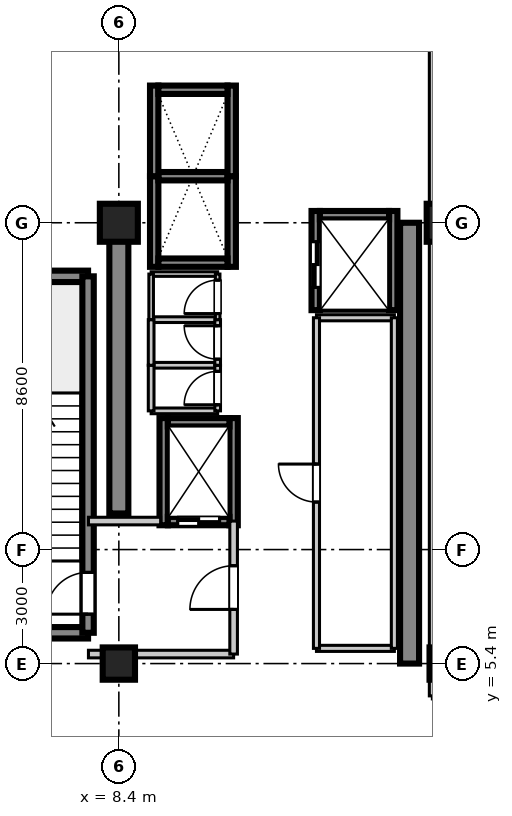
"""IFC4 building model, lengths in metres.
Left out: names, types, materials, properties, quantities, classifications, styles, units other than length and angle.
Written with IfcOpenShell. Run it as: python <this file> out.ifc"""

import sys

from ifc_helpers import new_model, si_unit, direction, frame, frame_2d, origin, origin_2d, place, context, subcontext, project, spatial, rectangle, extrude, source, transform, mapped, element, fill, save


model = new_model("IFC4")
c1 = context("Model", 3, precision=1e-05, world=origin(), true_north=direction((0.0, 1.0)))
c2 = subcontext(c1, "Body", "Model", "MODEL_VIEW")
j1 = project(units=[si_unit("LENGTHUNIT", "METRE"), si_unit("PLANEANGLEUNIT", "RADIAN")], contexts=[c1])
p1 = place(None, origin())
s1 = spatial("IfcSite", under=j1, at=p1, CompositionType="ELEMENT")
p2 = place(p1, origin())
s2 = spatial("IfcBuilding", under=s1, at=p2, CompositionType="ELEMENT")
p3 = place(p2, frame((0.0, 0.0, 256.7)))
s3 = spatial("IfcBuildingStorey", under=s2, at=p3, CompositionType="ELEMENT", Elevation=256.7)
m1 = source(origin(), c2, "Body", "SweptSolid", [
    extrude(rectangle(XDim=0.85, YDim=0.85, at=origin_2d()), origin(), (0.0, 0.0, 1.0), 4.755),
])
p4 = place(p3, frame((8.4, 5.4, 0.0), z_axis=(0.0, 0.0, 1.0), x_axis=(1.0, 0.0, 0.0)))
e1 = element("IfcColumn", 1, at=p4, inside=s3, PredefinedType="PILASTER", context=c2, shape_type="MappedRepresentation", body=[
    mapped(m1, transform((0.0, 0.0, 0.0), scale=1.0)),
])
m2 = source(origin(), c2, "Body", "SweptSolid", [
    extrude(rectangle(XDim=1.0, YDim=1.0, at=origin_2d()), origin(), (0.0, 0.0, 1.0), 4.755),
])
p5 = place(p3, frame((8.4, 17.0, 0.0), z_axis=(0.0, 0.0, 1.0), x_axis=(1.0, 0.0, 0.0)))
e2 = element("IfcColumn", 2, at=p5, inside=s3, PredefinedType="COLUMN", context=c2, shape_type="MappedRepresentation", body=[
    mapped(m2, transform((0.0, 0.0, 0.0), scale=1.0)),
])
p6 = place(p3, frame((17.0, 5.4, 0.0), z_axis=(0.0, 0.0, 1.0), x_axis=(1.0, 0.0, 0.0)))
e3 = element("IfcColumn", 3, at=p6, inside=s3, PredefinedType="PILASTER", context=c2, shape_type="MappedRepresentation", body=[
    mapped(m1, transform((0.0, 0.0, 0.0), scale=1.0)),
])
p7 = place(p3, frame((17.0, 17.0, 0.0), z_axis=(0.0, 0.0, 1.0), x_axis=(1.0, 0.0, 0.0)))
e4 = element("IfcColumn", 4, at=p7, inside=s3, PredefinedType="COLUMN", context=c2, shape_type="MappedRepresentation", body=[
    mapped(m2, transform((0.0, 0.0, 0.0), scale=1.0)),
])
m3 = source(origin(), c2, "Body", "SweptSolid", [
    extrude(rectangle(XDim=7.65, YDim=0.5, at=frame_2d((3.825, 0.0))), origin(), (0.0, 0.0, 1.0), 4.44),
])
p8 = place(p3, frame((8.4, 9.35, 0.0), z_axis=(0.0, 0.0, 1.0), x_axis=(0.0, 1.0, 0.0)))
e5 = element("IfcWall", 5, at=p8, inside=s3, PredefinedType="SHEAR", context=c2, shape_type="MappedRepresentation", body=[
    mapped(m3, transform((0.0, 0.0, 0.0), scale=1.0)),
])
m4 = source(origin(), c2, "Body", "SweptSolid", [
    extrude(rectangle(XDim=11.6, YDim=0.5, at=frame_2d((5.8, 0.0))), origin(), (0.0, 0.0, 1.0), 4.44),
])
p9 = place(p3, frame((16.05, 5.4, 0.0), z_axis=(0.0, 0.0, 1.0), x_axis=(0.0, 1.0, 0.0)))
e6 = element("IfcWall", 6, at=p9, inside=s3, PredefinedType="SHEAR", context=c2, shape_type="MappedRepresentation", body=[
    mapped(m4, transform((0.0, 0.0, 0.0), scale=1.0)),
])
m5 = source(origin(), c2, "Body", "SweptSolid", [
    extrude(rectangle(XDim=3.98, YDim=0.3, at=frame_2d((1.99, 0.0))), origin(), (0.0, 0.0, 1.0), 4.44),
])
for number, where, z_axis, x_axis in (
    (7, (3.61, 6.21, 0.0), (0.0, 0.0, 1.0), (1.0, 0.0, 0.0)),
    (8, (3.61, 15.59, 0.0), (0.0, 0.0, 1.0), (1.0, 0.0, 0.0)),
):
    element("IfcWall", number, at=place(p3, frame(where, z_axis=z_axis, x_axis=x_axis)), inside=s3, PredefinedType="SHEAR", context=c2, shape_type="MappedRepresentation", body=[
        mapped(m5, transform((0.0, 0.0, 0.0), scale=1.0)),
    ])
m6 = source(origin(), c2, "Body", "SweptSolid", [
    extrude(rectangle(XDim=9.38, YDim=0.3, at=frame_2d((4.69, 0.0))), origin(), (0.0, 0.0, 1.0), 4.44),
])
p10 = place(p3, frame((7.59, 6.21, 0.0), z_axis=(0.0, 0.0, 1.0), x_axis=(0.0, 1.0, 0.0)))
e9 = element("IfcWall", 9, at=p10, inside=s3, PredefinedType="SHEAR", context=c2, shape_type="MappedRepresentation", body=[
    mapped(m6, transform((0.0, 0.0, 0.0), scale=1.0)),
])
p11 = place(p10, frame((0.49, 0.0, 0.0)))
e10 = element("IfcOpeningElement", 10, at=p11, cuts=e9, PredefinedType="OPENING", context=c2, shape_type="SweptSolid", body=[
    extrude(rectangle(XDim=1.1, YDim=2.15, at=frame_2d((0.55, 1.075))), frame((0.0, 0.16, 0.0), z_axis=(0.0, -1.0, 0.0), x_axis=(1.0, 0.0, 0.0)), (0.0, 0.0, 1.0), 0.32),
])
m7 = source(origin(), c2, "Body", "SweptSolid", [
    extrude(rectangle(XDim=2.385, YDim=0.22, at=frame_2d((1.192, 0.0))), origin(), (0.0, 0.0, 1.0), 4.44),
])
for number, where, z_axis, x_axis in (
    (11, (9.33, 15.84, 0.0), (0.0, 0.0, 1.0), (0.0, 1.0, 0.0)),
    (12, (11.37, 15.84, 0.0), (0.0, 0.0, 1.0), (0.0, 1.0, 0.0)),
):
    element("IfcWall", number, at=place(p3, frame(where, z_axis=z_axis, x_axis=x_axis)), inside=s3, PredefinedType="SHEAR", context=c2, shape_type="MappedRepresentation", body=[
        mapped(m7, transform((0.0, 0.0, 0.0), scale=1.0)),
    ])
m8 = source(origin(), c2, "Body", "SweptSolid", [
    extrude(rectangle(XDim=1.82, YDim=0.22, at=frame_2d((0.91, 0.0))), origin(), (0.0, 0.0, 1.0), 4.44),
])
p12 = place(p3, frame((9.44, 15.95, 0.0), z_axis=(0.0, 0.0, 1.0), x_axis=(1.0, 0.0, 0.0)))
e13 = element("IfcWall", 13, at=p12, inside=s3, PredefinedType="SHEAR", context=c2, shape_type="MappedRepresentation", body=[
    mapped(m8, transform((0.0, 0.0, 0.0), scale=1.0)),
])
m9 = source(origin(), c2, "Body", "SweptSolid", [
    extrude(rectangle(XDim=1.82, YDim=0.22, at=frame_2d((0.91, 0.0))), origin(), (0.0, 0.0, 1.0), 4.8),
])
p13 = place(p3, frame((9.44, 18.225, 0.0), z_axis=(0.0, 0.0, 1.0), x_axis=(1.0, 0.0, 0.0)))
e14 = element("IfcWall", 14, at=p13, inside=s3, PredefinedType="SHEAR", context=c2, shape_type="MappedRepresentation", body=[
    mapped(m9, transform((0.0, 0.0, 0.0), scale=1.0)),
])
for number, where, z_axis, x_axis in (
    (15, (9.33, 18.225, 0.0), (0.0, 0.0, 1.0), (0.0, 1.0, 0.0)),
    (16, (11.37, 18.225, 0.0), (0.0, 0.0, 1.0), (0.0, 1.0, 0.0)),
):
    element("IfcWall", number, at=place(p3, frame(where, z_axis=z_axis, x_axis=x_axis)), inside=s3, PredefinedType="SHEAR", context=c2, shape_type="MappedRepresentation", body=[
        mapped(m7, transform((0.0, 0.0, 0.0), scale=1.0)),
    ])
p14 = place(p3, frame((9.44, 20.5, 0.0), z_axis=(0.0, 0.0, 1.0), x_axis=(1.0, 0.0, 0.0)))
e17 = element("IfcWall", 17, at=p14, inside=s3, PredefinedType="SHEAR", context=c2, shape_type="MappedRepresentation", body=[
    mapped(m8, transform((0.0, 0.0, 0.0), scale=1.0)),
])
m10 = source(origin(), c2, "Body", "SweptSolid", [
    extrude(rectangle(XDim=2.82, YDim=0.22, at=frame_2d((1.41, 0.0))), origin(), (0.0, 0.0, 1.0), 4.44),
])
for number, where, z_axis, x_axis in (
    (18, (9.58, 9.04, 0.0), (0.0, 0.0, 1.0), (0.0, 1.0, 0.0)),
    (19, (11.42, 9.04, 0.0), (0.0, 0.0, 1.0), (0.0, 1.0, 0.0)),
):
    element("IfcWall", number, at=place(p3, frame(where, z_axis=z_axis, x_axis=x_axis)), inside=s3, PredefinedType="SHEAR", context=c2, shape_type="MappedRepresentation", body=[
        mapped(m10, transform((0.0, 0.0, 0.0), scale=1.0)),
    ])
m11 = source(origin(), c2, "Body", "SweptSolid", [
    extrude(rectangle(XDim=1.62, YDim=0.22, at=frame_2d((0.81, 0.0))), origin(), (0.0, 0.0, 1.0), 4.44),
])
p15 = place(p3, frame((9.69, 9.15, 0.0), z_axis=(0.0, 0.0, 1.0), x_axis=(1.0, 0.0, 0.0)))
e20 = element("IfcWall", 20, at=p15, inside=s3, PredefinedType="SHEAR", context=c2, shape_type="MappedRepresentation", body=[
    mapped(m11, transform((0.0, 0.0, 0.0), scale=1.0)),
])
p16 = place(p15, frame((0.26, 0.0, 0.0)))
e21 = element("IfcOpeningElement", 21, at=p16, cuts=e20, PredefinedType="OPENING", context=c2, shape_type="SweptSolid", body=[
    extrude(rectangle(XDim=1.1, YDim=2.2, at=frame_2d((0.55, 1.1))), frame((0.0, 0.12, 0.0), z_axis=(0.0, -1.0, 0.0), x_axis=(1.0, 0.0, 0.0)), (0.0, 0.0, 1.0), 0.24),
])
p17 = place(p3, frame((9.69, 11.75, 0.0), z_axis=(0.0, 0.0, 1.0), x_axis=(1.0, 0.0, 0.0)))
e22 = element("IfcWall", 22, at=p17, inside=s3, PredefinedType="SHEAR", context=c2, shape_type="MappedRepresentation", body=[
    mapped(m11, transform((0.0, 0.0, 0.0), scale=1.0)),
])
m12 = source(origin(), c2, "Body", "SweptSolid", [
    extrude(rectangle(XDim=2.61, YDim=0.22, at=frame_2d((1.305, 0.0))), origin(), (0.0, 0.0, 1.0), 4.44),
])
p18 = place(p3, frame((13.58, 14.7, 0.0), z_axis=(0.0, 0.0, 1.0), x_axis=(0.0, 1.0, 0.0)))
e23 = element("IfcWall", 23, at=p18, inside=s3, PredefinedType="SHEAR", context=c2, shape_type="MappedRepresentation", body=[
    mapped(m12, transform((0.0, 0.0, 0.0), scale=1.0)),
])
p19 = place(p18, frame((0.6, 0.0, 0.0)))
e24 = element("IfcOpeningElement", 24, at=p19, cuts=e23, PredefinedType="OPENING", context=c2, shape_type="SweptSolid", body=[
    extrude(rectangle(XDim=1.2, YDim=2.2, at=frame_2d((0.6, 1.1))), frame((0.0, 0.12, 0.0), z_axis=(0.0, -1.0, 0.0), x_axis=(1.0, 0.0, 0.0)), (0.0, 0.0, 1.0), 0.24),
])
p20 = place(p3, frame((15.62, 14.7, 0.0), z_axis=(0.0, 0.0, 1.0), x_axis=(0.0, 1.0, 0.0)))
e25 = element("IfcWall", 25, at=p20, inside=s3, PredefinedType="SHEAR", context=c2, shape_type="MappedRepresentation", body=[
    mapped(m12, transform((0.0, 0.0, 0.0), scale=1.0)),
])
p21 = place(p3, frame((13.69, 17.2, 0.0), z_axis=(0.0, 0.0, 1.0), x_axis=(1.0, 0.0, 0.0)))
e26 = element("IfcWall", 26, at=p21, inside=s3, PredefinedType="SHEAR", context=c2, shape_type="MappedRepresentation", body=[
    mapped(m8, transform((0.0, 0.0, 0.0), scale=1.0)),
])
m13 = source(origin(), c2, "Body", "SweptSolid", [
    extrude(rectangle(XDim=3.82, YDim=0.2, at=frame_2d((1.91, 0.0))), origin(), (0.0, 0.0, 1.0), 3.4),
])
p22 = place(p3, frame((7.6, 5.65, 0.0), z_axis=(0.0, 0.0, 1.0), x_axis=(1.0, 0.0, 0.0)))
e27 = element("IfcWall", 27, at=p22, inside=s3, PredefinedType="PARTITIONING", context=c2, shape_type="MappedRepresentation", body=[
    mapped(m13, transform((0.0, 0.0, 0.0), scale=1.0)),
])
m14 = source(origin(), c2, "Body", "SweptSolid", [
    extrude(rectangle(XDim=1.9, YDim=0.2, at=frame_2d((0.95, 0.0))), origin(), (0.0, 0.0, 1.0), 3.4),
])
p23 = place(p3, frame((7.6, 9.15, 0.0), z_axis=(0.0, 0.0, 1.0), x_axis=(1.0, 0.0, 0.0)))
e28 = element("IfcWall", 28, at=p23, inside=s3, PredefinedType="PARTITIONING", context=c2, shape_type="MappedRepresentation", body=[
    mapped(m14, transform((0.0, 0.0, 0.0), scale=1.0)),
])
m15 = source(origin(), c2, "Body", "SweptSolid", [
    extrude(rectangle(XDim=3.5, YDim=0.2, at=frame_2d((1.75, 0.0))), origin(), (0.0, 0.0, 1.0), 3.4),
])
p24 = place(p3, frame((11.42, 5.65, 0.0), z_axis=(0.0, 0.0, 1.0), x_axis=(0.0, 1.0, 0.0)))
e29 = element("IfcWall", 29, at=p24, inside=s3, PredefinedType="PARTITIONING", context=c2, shape_type="MappedRepresentation", body=[
    mapped(m15, transform((0.0, 0.0, 0.0), scale=1.0)),
])
p25 = place(p24, frame((1.175, 0.0, 0.0)))
e30 = element("IfcOpeningElement", 30, at=p25, cuts=e29, PredefinedType="OPENING", context=c2, shape_type="SweptSolid", body=[
    extrude(rectangle(XDim=1.15, YDim=2.15, at=frame_2d((0.575, 1.075))), frame((0.0, 0.11, 0.0), z_axis=(0.0, -1.0, 0.0), x_axis=(1.0, 0.0, 0.0)), (0.0, 0.0, 1.0), 0.22),
])
m16 = source(origin(), c2, "Body", "SweptSolid", [
    extrude(rectangle(XDim=1.75, YDim=0.15, at=frame_2d((0.875, 0.0))), origin(), (0.0, 0.0, 1.0), 3.4),
])
for number, where, z_axis, x_axis in (
    (31, (9.25, 12.05, 0.0), (0.0, 0.0, 1.0), (1.0, 0.0, 0.0)),
    (32, (9.25, 13.25, 0.0), (0.0, 0.0, 1.0), (1.0, 0.0, 0.0)),
):
    element("IfcWall", number, at=place(p3, frame(where, z_axis=z_axis, x_axis=x_axis)), inside=s3, PredefinedType="PARTITIONING", context=c2, shape_type="MappedRepresentation", body=[
        mapped(m16, transform((0.0, 0.0, 0.0), scale=1.0)),
    ])
m17 = source(origin(), c2, "Body", "SweptSolid", [
    extrude(rectangle(XDim=1.2, YDim=0.15, at=frame_2d((0.6, 0.0))), origin(), (0.0, 0.0, 1.0), 3.4),
])
p26 = place(p3, frame((9.25, 12.05, 0.0), z_axis=(0.0, 0.0, 1.0), x_axis=(0.0, 1.0, 0.0)))
e33 = element("IfcWall", 33, at=p26, inside=s3, PredefinedType="PARTITIONING", context=c2, shape_type="MappedRepresentation", body=[
    mapped(m17, transform((0.0, 0.0, 0.0), scale=1.0)),
])
p27 = place(p3, frame((11.0, 12.05, 0.0), z_axis=(0.0, 0.0, 1.0), x_axis=(0.0, 1.0, 0.0)))
e34 = element("IfcWall", 34, at=p27, inside=s3, PredefinedType="PARTITIONING", context=c2, shape_type="MappedRepresentation", body=[
    mapped(m17, transform((0.0, 0.0, 0.0), scale=1.0)),
])
p28 = place(p27, frame((0.16, 0.0, 0.0)))
e35 = element("IfcOpeningElement", 35, at=p28, cuts=e34, PredefinedType="OPENING", context=c2, shape_type="SweptSolid", body=[
    extrude(rectangle(XDim=0.88, YDim=2.1, at=frame_2d((0.44, 1.05))), frame((0.0, 0.085, 0.0), z_axis=(0.0, -1.0, 0.0), x_axis=(1.0, 0.0, 0.0)), (0.0, 0.0, 1.0), 0.17),
])
p29 = place(p3, frame((9.25, 14.45, 0.0), z_axis=(0.0, 0.0, 1.0), x_axis=(1.0, 0.0, 0.0)))
e36 = element("IfcWall", 36, at=p29, inside=s3, PredefinedType="PARTITIONING", context=c2, shape_type="MappedRepresentation", body=[
    mapped(m16, transform((0.0, 0.0, 0.0), scale=1.0)),
])
p30 = place(p3, frame((9.25, 13.25, 0.0), z_axis=(0.0, 0.0, 1.0), x_axis=(0.0, 1.0, 0.0)))
e37 = element("IfcWall", 37, at=p30, inside=s3, PredefinedType="PARTITIONING", context=c2, shape_type="MappedRepresentation", body=[
    mapped(m17, transform((0.0, 0.0, 0.0), scale=1.0)),
])
p31 = place(p3, frame((11.0, 13.25, 0.0), z_axis=(0.0, 0.0, 1.0), x_axis=(0.0, 1.0, 0.0)))
e38 = element("IfcWall", 38, at=p31, inside=s3, PredefinedType="PARTITIONING", context=c2, shape_type="MappedRepresentation", body=[
    mapped(m17, transform((0.0, 0.0, 0.0), scale=1.0)),
])
p32 = place(p31, frame((0.16, 0.0, 0.0)))
e39 = element("IfcOpeningElement", 39, at=p32, cuts=e38, PredefinedType="OPENING", context=c2, shape_type="SweptSolid", body=[
    extrude(rectangle(XDim=0.88, YDim=2.1, at=frame_2d((0.44, 1.05))), frame((0.0, 0.085, 0.0), z_axis=(0.0, -1.0, 0.0), x_axis=(1.0, 0.0, 0.0)), (0.0, 0.0, 1.0), 0.17),
])
m18 = source(origin(), c2, "Body", "SweptSolid", [
    extrude(rectangle(XDim=1.75, YDim=0.12, at=frame_2d((0.875, 0.0))), origin(), (0.0, 0.0, 1.0), 3.4),
])
p33 = place(p3, frame((9.25, 15.65, 0.0), z_axis=(0.0, 0.0, 1.0), x_axis=(1.0, 0.0, 0.0)))
e40 = element("IfcWall", 40, at=p33, inside=s3, PredefinedType="PARTITIONING", context=c2, shape_type="MappedRepresentation", body=[
    mapped(m18, transform((0.0, 0.0, 0.0), scale=1.0)),
])
m19 = source(origin(), c2, "Body", "SweptSolid", [
    extrude(rectangle(XDim=1.2, YDim=0.12, at=frame_2d((0.6, 0.0))), origin(), (0.0, 0.0, 1.0), 3.4),
])
p34 = place(p3, frame((9.25, 14.45, 0.0), z_axis=(0.0, 0.0, 1.0), x_axis=(0.0, 1.0, 0.0)))
e41 = element("IfcWall", 41, at=p34, inside=s3, PredefinedType="PARTITIONING", context=c2, shape_type="MappedRepresentation", body=[
    mapped(m19, transform((0.0, 0.0, 0.0), scale=1.0)),
])
p35 = place(p3, frame((11.0, 14.45, 0.0), z_axis=(0.0, 0.0, 1.0), x_axis=(0.0, 1.0, 0.0)))
e42 = element("IfcWall", 42, at=p35, inside=s3, PredefinedType="PARTITIONING", context=c2, shape_type="MappedRepresentation", body=[
    mapped(m19, transform((0.0, 0.0, 0.0), scale=1.0)),
])
p36 = place(p35, frame((0.16, 0.0, 0.0)))
e43 = element("IfcOpeningElement", 43, at=p36, cuts=e42, PredefinedType="OPENING", context=c2, shape_type="SweptSolid", body=[
    extrude(rectangle(XDim=0.88, YDim=2.1, at=frame_2d((0.44, 1.05))), frame((0.0, 0.07, 0.0), z_axis=(0.0, -1.0, 0.0), x_axis=(1.0, 0.0, 0.0)), (0.0, 0.0, 1.0), 0.14),
])
m20 = source(origin(), c2, "Body", "SweptSolid", [
    extrude(rectangle(XDim=2.05, YDim=0.16, at=frame_2d((1.025, 0.0))), origin(), (0.0, 0.0, 1.0), 3.4),
])
for number, where, z_axis, x_axis in (
    (44, (13.6, 5.8, 0.0), (0.0, 0.0, 1.0), (1.0, 0.0, 0.0)),
    (45, (13.6, 14.5, 0.0), (0.0, 0.0, 1.0), (1.0, 0.0, 0.0)),
):
    element("IfcWall", number, at=place(p3, frame(where, z_axis=z_axis, x_axis=x_axis)), inside=s3, PredefinedType="PARTITIONING", context=c2, shape_type="MappedRepresentation", body=[
        mapped(m20, transform((0.0, 0.0, 0.0), scale=1.0)),
    ])
m21 = source(origin(), c2, "Body", "SweptSolid", [
    extrude(rectangle(XDim=8.7, YDim=0.16, at=frame_2d((4.35, 0.0))), origin(), (0.0, 0.0, 1.0), 3.4),
])
p37 = place(p3, frame((13.6, 5.8, 0.0), z_axis=(0.0, 0.0, 1.0), x_axis=(0.0, 1.0, 0.0)))
e46 = element("IfcWall", 46, at=p37, inside=s3, PredefinedType="PARTITIONING", context=c2, shape_type="MappedRepresentation", body=[
    mapped(m21, transform((0.0, 0.0, 0.0), scale=1.0)),
])
p38 = place(p37, frame((3.85, 0.0, 0.0)))
e47 = element("IfcOpeningElement", 47, at=p38, cuts=e46, PredefinedType="OPENING", context=c2, shape_type="SweptSolid", body=[
    extrude(rectangle(XDim=1.0, YDim=2.1, at=frame_2d((0.5, 1.05))), frame((0.0, 0.09, 0.0), z_axis=(0.0, -1.0, 0.0), x_axis=(1.0, 0.0, 0.0)), (0.0, 0.0, 1.0), 0.18),
])
p39 = place(p3, frame((15.65, 5.8, 0.0), z_axis=(0.0, 0.0, 1.0), x_axis=(0.0, 1.0, 0.0)))
e48 = element("IfcWall", 48, at=p39, inside=s3, PredefinedType="PARTITIONING", context=c2, shape_type="MappedRepresentation", body=[
    mapped(m21, transform((0.0, 0.0, 0.0), scale=1.0)),
])
m22 = source(origin(), c2, "Body", "SweptSolid", [
    extrude(rectangle(XDim=19.35, YDim=0.16, at=frame_2d((9.675, 0.0))), origin(), (0.0, 0.0, 1.0), 3.4),
])
p40 = place(p3, frame((16.65, 4.55, 0.0), z_axis=(0.0, 0.0, 1.0), x_axis=(0.0, 1.0, 0.0)))
e49 = element("IfcWall", 49, at=p40, inside=s3, PredefinedType="PARTITIONING", context=c2, shape_type="MappedRepresentation", body=[
    mapped(m22, transform((0.0, 0.0, 0.0), scale=1.0)),
])
m23 = source(origin(), c2, "Body", "SweptSolid", [
    extrude(rectangle(XDim=1.1, YDim=2.15, at=frame_2d((0.55, 1.075))), frame((0.0, 0.025, 0.0), z_axis=(0.0, -1.0, 0.0), x_axis=(1.0, 0.0, 0.0)), (0.0, 0.0, 1.0), 0.05),
])
p41 = place(p11, origin())
e50 = element("IfcDoor", 50, at=p41, inside=s3, OperationType="SINGLE_SWING_LEFT", PredefinedType="DOOR", context=c2, shape_type="MappedRepresentation", body=[
    mapped(m23, transform((0.0, 0.0, 0.0), scale=1.0)),
])
fill(e10, e50)
m24 = source(origin(), c2, "Body", "SweptSolid", [
    extrude(rectangle(XDim=1.1, YDim=2.2, at=frame_2d((0.55, 1.1))), frame((0.0, 0.025, 0.0), z_axis=(0.0, -1.0, 0.0), x_axis=(1.0, 0.0, 0.0)), (0.0, 0.0, 1.0), 0.05),
])
p42 = place(p16, frame((1.1, 0.0, 0.0), z_axis=(0.0, 0.0, 1.0), x_axis=(-1.0, 0.0, 0.0)))
e51 = element("IfcDoor", 51, at=p42, inside=s3, OperationType="DOUBLE_DOOR_SLIDING", PredefinedType="DOOR", context=c2, shape_type="MappedRepresentation", body=[
    mapped(m24, transform((0.0, 0.0, 0.0), scale=1.0)),
])
fill(e21, e51)
m25 = source(origin(), c2, "Body", "SweptSolid", [
    extrude(rectangle(XDim=1.2, YDim=2.2, at=frame_2d((0.6, 1.1))), frame((0.0, 0.025, 0.0), z_axis=(0.0, -1.0, 0.0), x_axis=(1.0, 0.0, 0.0)), (0.0, 0.0, 1.0), 0.05),
])
p43 = place(p19, origin())
e52 = element("IfcDoor", 52, at=p43, inside=s3, OperationType="DOUBLE_DOOR_SLIDING", PredefinedType="DOOR", context=c2, shape_type="MappedRepresentation", body=[
    mapped(m25, transform((0.0, 0.0, 0.0), scale=1.0)),
])
fill(e24, e52)
m26 = source(origin(), c2, "Body", "SweptSolid", [
    extrude(rectangle(XDim=1.15, YDim=2.15, at=frame_2d((0.575, 1.075))), frame((0.0, 0.025, 0.0), z_axis=(0.0, -1.0, 0.0), x_axis=(1.0, 0.0, 0.0)), (0.0, 0.0, 1.0), 0.05),
])
p44 = place(p25, frame((1.15, 0.0, 0.0), z_axis=(0.0, 0.0, 1.0), x_axis=(-1.0, 0.0, 0.0)))
e53 = element("IfcDoor", 53, at=p44, inside=s3, OperationType="SINGLE_SWING_LEFT", PredefinedType="DOOR", context=c2, shape_type="MappedRepresentation", body=[
    mapped(m26, transform((0.0, 0.0, 0.0), scale=1.0)),
])
fill(e30, e53)
m27 = source(origin(), c2, "Body", "SweptSolid", [
    extrude(rectangle(XDim=0.88, YDim=2.1, at=frame_2d((0.44, 1.05))), frame((0.0, 0.025, 0.0), z_axis=(0.0, -1.0, 0.0), x_axis=(1.0, 0.0, 0.0)), (0.0, 0.0, 1.0), 0.05),
])
p45 = place(p28, origin())
e54 = element("IfcDoor", 54, at=p45, inside=s3, OperationType="SINGLE_SWING_LEFT", PredefinedType="DOOR", context=c2, shape_type="MappedRepresentation", body=[
    mapped(m27, transform((0.0, 0.0, 0.0), scale=1.0)),
])
fill(e35, e54)
p46 = place(p32, origin())
e55 = element("IfcDoor", 55, at=p46, inside=s3, OperationType="SINGLE_SWING_RIGHT", PredefinedType="DOOR", context=c2, shape_type="MappedRepresentation", body=[
    mapped(m27, transform((0.0, 0.0, 0.0), scale=1.0)),
])
fill(e39, e55)
p47 = place(p36, origin())
e56 = element("IfcDoor", 56, at=p47, inside=s3, OperationType="SINGLE_SWING_LEFT", PredefinedType="DOOR", context=c2, shape_type="MappedRepresentation", body=[
    mapped(m27, transform((0.0, 0.0, 0.0), scale=1.0)),
])
fill(e43, e56)
m28 = source(origin(), c2, "Body", "SweptSolid", [
    extrude(rectangle(XDim=1.0, YDim=2.1, at=frame_2d((0.5, 1.05))), frame((0.0, 0.025, 0.0), z_axis=(0.0, -1.0, 0.0), x_axis=(1.0, 0.0, 0.0)), (0.0, 0.0, 1.0), 0.05),
])
p48 = place(p38, frame((1.0, 0.0, 0.0), z_axis=(0.0, 0.0, 1.0), x_axis=(-1.0, 0.0, 0.0)))
e57 = element("IfcDoor", 57, at=p48, inside=s3, OperationType="SINGLE_SWING_RIGHT", PredefinedType="DOOR", context=c2, shape_type="MappedRepresentation", body=[
    mapped(m28, transform((0.0, 0.0, 0.0), scale=1.0)),
])
fill(e47, e57)
save(model, sys.argv[1])
